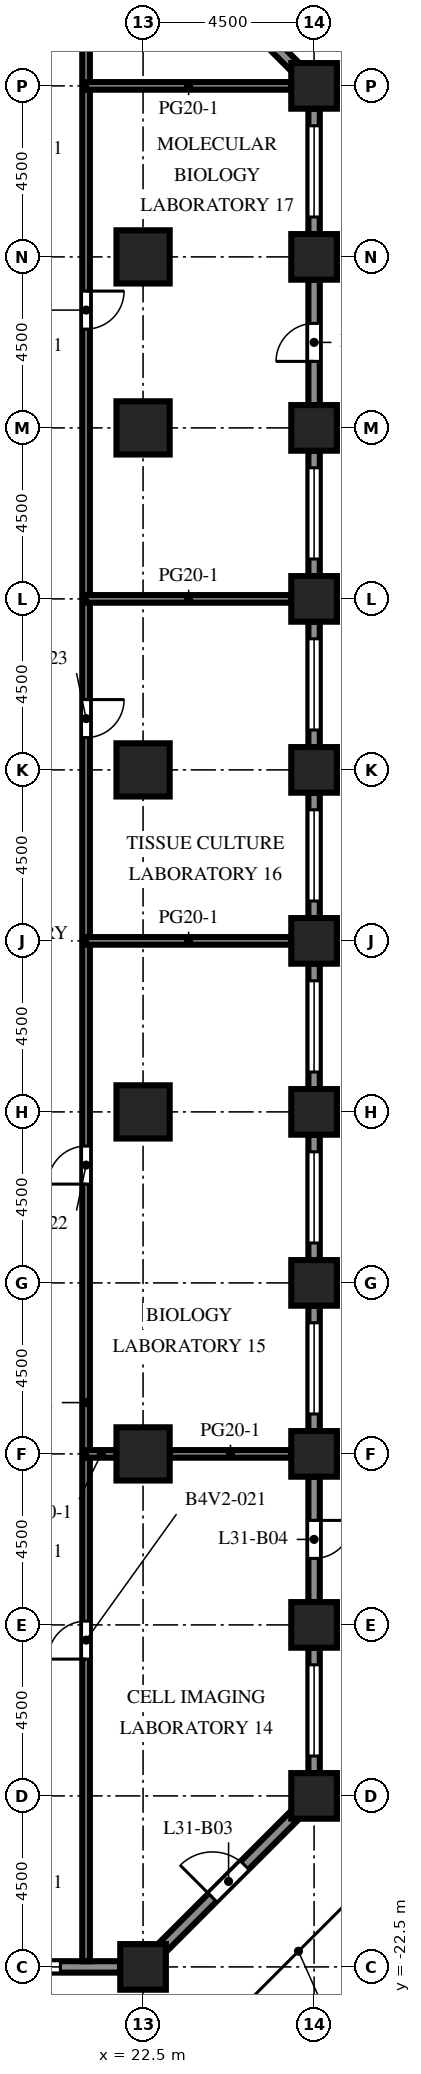
"""IFC4 building model, lengths in metres.
Left out: names, types, materials, properties, quantities, classifications, styles, units other than length and angle.
Written with IfcOpenShell. Run it as: python <this file> out.ifc"""

import sys

from ifc_helpers import new_model, si_unit, direction, frame, frame_2d, origin, origin_2d, place, context, subcontext, project, spatial, rectangle, extrude, element, fill, save


model = new_model("IFC4")
c1 = context("Model", 3, precision=1e-05, world=origin(), true_north=direction((0.0, 1.0)))
c2 = subcontext(c1, "Body", "Model", "MODEL_VIEW")
j1 = project(units=[si_unit("LENGTHUNIT", "METRE"), si_unit("PLANEANGLEUNIT", "RADIAN")], contexts=[c1])
p1 = place(None, origin())
s1 = spatial("IfcSite", under=j1, at=p1, CompositionType="ELEMENT")
p2 = place(p1, origin())
s2 = spatial("IfcBuilding", under=s1, at=p2, CompositionType="ELEMENT")
p3 = place(p2, frame((0.0, 0.0, 137.2)))
s3 = spatial("IfcBuildingStorey", under=s2, at=p3, CompositionType="ELEMENT", Elevation=137.2)
for number, where, z_axis, x_axis in (
    (1, (22.5, -22.5, 0.0), (0.0, 0.0, 1.0), (1.0, 0.0, 0.0)),
    (2, (27.0, -18.0, 0.0), (0.0, 0.0, 1.0), (1.0, 0.0, 0.0)),
    (3, (27.0, -13.5, 0.0), (0.0, 0.0, 1.0), (1.0, 0.0, 0.0)),
    (4, (27.0, -9.0, 0.0), (0.0, 0.0, 1.0), (1.0, 0.0, 0.0)),
    (5, (27.0, -4.5, 0.0), (0.0, 0.0, 1.0), (1.0, 0.0, 0.0)),
    (6, (27.0, 0.0, 0.0), (0.0, 0.0, 1.0), (1.0, 0.0, 0.0)),
    (7, (27.0, 4.5, 0.0), (0.0, 0.0, 1.0), (1.0, 0.0, 0.0)),
    (8, (27.0, 9.0, 0.0), (0.0, 0.0, 1.0), (1.0, 0.0, 0.0)),
    (9, (27.0, 13.5, 0.0), (0.0, 0.0, 1.0), (1.0, 0.0, 0.0)),
    (10, (27.0, 18.0, 0.0), (0.0, 0.0, 1.0), (1.0, 0.0, 0.0)),
    (11, (27.0, 22.5, 0.0), (0.0, 0.0, 1.0), (1.0, 0.0, 0.0)),
    (12, (27.0, 27.0, 0.0), (0.0, 0.0, 1.0), (1.0, 0.0, 0.0)),
):
    element("IfcColumn", number, at=place(p3, frame(where, z_axis=z_axis, x_axis=x_axis)), inside=s3, PredefinedType="COLUMN", context=c2, shape_type="SweptSolid", body=[
        extrude(rectangle(XDim=1.2, YDim=1.2, at=origin_2d()), origin(), (0.0, 0.0, 1.0), 4.1),
    ])
for number, where, z_axis, x_axis in (
    (13, (22.5, -9.0, 0.0), (0.0, 0.0, 1.0), (1.0, 0.0, 0.0)),
    (14, (22.5, 0.0, 0.0), (0.0, 0.0, 1.0), (1.0, 0.0, 0.0)),
    (15, (22.5, 9.0, 0.0), (0.0, 0.0, 1.0), (1.0, 0.0, 0.0)),
    (16, (22.5, 18.0, 0.0), (0.0, 0.0, 1.0), (1.0, 0.0, 0.0)),
    (17, (22.5, 22.5, 0.0), (0.0, 0.0, 1.0), (1.0, 0.0, 0.0)),
):
    element("IfcColumn", number, at=place(p3, frame(where, z_axis=z_axis, x_axis=x_axis)), inside=s3, PredefinedType="COLUMN", context=c2, shape_type="SweptSolid", body=[
        extrude(rectangle(XDim=1.4, YDim=1.4, at=origin_2d()), origin(), (0.0, 0.0, 1.0), 4.1),
    ])
p4 = place(p3, frame((21.9, -22.5, 0.0), z_axis=(0.0, 0.0, 1.0), x_axis=(-1.0, 0.0, 0.0)))
e18 = element("IfcWall", 18, at=p4, inside=s3, PredefinedType="SOLIDWALL", context=c2, shape_type="SweptSolid", body=[
    extrude(rectangle(XDim=3.3, YDim=0.3, at=frame_2d((1.65, 0.0))), origin(), (0.0, 0.0, 1.0), 2.75),
])
p5 = place(p4, frame((1.575, 0.0, 0.8)))
e19 = element("IfcOpeningElement", 19, at=p5, cuts=e18, PredefinedType="OPENING", context=c2, shape_type="SweptSolid", body=[
    extrude(rectangle(XDim=1.2, YDim=1.7, at=frame_2d((0.6, 0.85))), frame((0.0, 0.16, 0.0), z_axis=(0.0, -1.0, 0.0), x_axis=(1.0, 0.0, 0.0)), (0.0, 0.0, 1.0), 0.32),
])
p6 = place(p3, frame((26.506, -18.494, 0.0), z_axis=(0.0, 0.0, 1.0), x_axis=(-0.707106781187, -0.707106781187, 0.0)))
e20 = element("IfcWall", 20, at=p6, inside=s3, PredefinedType="SOLIDWALL", context=c2, shape_type="SweptSolid", body=[
    extrude(rectangle(XDim=4.967, YDim=0.3, at=frame_2d((2.483, 0.0))), origin(), (0.0, 0.0, 1.0), 2.75),
])
p7 = place(p6, frame((1.884, 0.0, 0.0)))
e21 = element("IfcOpeningElement", 21, at=p7, cuts=e20, PredefinedType="OPENING", context=c2, shape_type="SweptSolid", body=[
    extrude(rectangle(XDim=1.2, YDim=2.2, at=frame_2d((0.6, 1.1))), frame((0.0, 0.16, 0.0), z_axis=(0.0, -1.0, 0.0), x_axis=(1.0, 0.0, 0.0)), (0.0, 0.0, 1.0), 0.32),
])
p8 = place(p3, frame((27.0, -14.1, 0.0), z_axis=(0.0, 0.0, 1.0), x_axis=(0.0, -1.0, 0.0)))
e22 = element("IfcWall", 22, at=p8, inside=s3, PredefinedType="SOLIDWALL", context=c2, shape_type="SweptSolid", body=[
    extrude(rectangle(XDim=3.3, YDim=0.3, at=frame_2d((1.65, 0.0))), origin(), (0.0, 0.0, 1.0), 2.75),
])
p9 = place(p8, frame((0.45, 0.0, 0.8)))
e23 = element("IfcOpeningElement", 23, at=p9, cuts=e22, PredefinedType="OPENING", context=c2, shape_type="SweptSolid", body=[
    extrude(rectangle(XDim=2.4, YDim=1.7, at=frame_2d((1.2, 0.85))), frame((0.0, 0.16, 0.0), z_axis=(0.0, -1.0, 0.0), x_axis=(1.0, 0.0, 0.0)), (0.0, 0.0, 1.0), 0.32),
])
p10 = place(p3, frame((27.0, -9.6, 0.0), z_axis=(0.0, 0.0, 1.0), x_axis=(0.0, -1.0, 0.0)))
e24 = element("IfcWall", 24, at=p10, inside=s3, PredefinedType="SOLIDWALL", context=c2, shape_type="SweptSolid", body=[
    extrude(rectangle(XDim=3.3, YDim=0.3, at=frame_2d((1.65, 0.0))), origin(), (0.0, 0.0, 1.0), 2.75),
])
p11 = place(p10, frame((1.15, 0.0, 0.0)))
e25 = element("IfcOpeningElement", 25, at=p11, cuts=e24, PredefinedType="OPENING", context=c2, shape_type="SweptSolid", body=[
    extrude(rectangle(XDim=1.0, YDim=2.2, at=frame_2d((0.5, 1.1))), frame((0.0, 0.16, 0.0), z_axis=(0.0, -1.0, 0.0), x_axis=(1.0, 0.0, 0.0)), (0.0, 0.0, 1.0), 0.32),
])
p12 = place(p3, frame((27.0, -5.1, 0.0), z_axis=(0.0, 0.0, 1.0), x_axis=(0.0, -1.0, 0.0)))
e26 = element("IfcWall", 26, at=p12, inside=s3, PredefinedType="SOLIDWALL", context=c2, shape_type="SweptSolid", body=[
    extrude(rectangle(XDim=3.3, YDim=0.3, at=frame_2d((1.65, 0.0))), origin(), (0.0, 0.0, 1.0), 2.75),
])
p13 = place(p12, frame((0.45, 0.0, 0.8)))
e27 = element("IfcOpeningElement", 27, at=p13, cuts=e26, PredefinedType="OPENING", context=c2, shape_type="SweptSolid", body=[
    extrude(rectangle(XDim=2.4, YDim=1.7, at=frame_2d((1.2, 0.85))), frame((0.0, 0.16, 0.0), z_axis=(0.0, -1.0, 0.0), x_axis=(1.0, 0.0, 0.0)), (0.0, 0.0, 1.0), 0.32),
])
p14 = place(p3, frame((27.0, -0.6, 0.0), z_axis=(0.0, 0.0, 1.0), x_axis=(0.0, -1.0, 0.0)))
e28 = element("IfcWall", 28, at=p14, inside=s3, PredefinedType="SOLIDWALL", context=c2, shape_type="SweptSolid", body=[
    extrude(rectangle(XDim=3.3, YDim=0.3, at=frame_2d((1.65, 0.0))), origin(), (0.0, 0.0, 1.0), 2.75),
])
p15 = place(p14, frame((0.45, 0.0, 0.8)))
e29 = element("IfcOpeningElement", 29, at=p15, cuts=e28, PredefinedType="OPENING", context=c2, shape_type="SweptSolid", body=[
    extrude(rectangle(XDim=2.4, YDim=1.7, at=frame_2d((1.2, 0.85))), frame((0.0, 0.16, 0.0), z_axis=(0.0, -1.0, 0.0), x_axis=(1.0, 0.0, 0.0)), (0.0, 0.0, 1.0), 0.32),
])
p16 = place(p3, frame((27.0, 3.9, 0.0), z_axis=(0.0, 0.0, 1.0), x_axis=(0.0, -1.0, 0.0)))
e30 = element("IfcWall", 30, at=p16, inside=s3, PredefinedType="SOLIDWALL", context=c2, shape_type="SweptSolid", body=[
    extrude(rectangle(XDim=3.3, YDim=0.3, at=frame_2d((1.65, 0.0))), origin(), (0.0, 0.0, 1.0), 2.75),
])
p17 = place(p16, frame((0.45, 0.0, 0.8)))
e31 = element("IfcOpeningElement", 31, at=p17, cuts=e30, PredefinedType="OPENING", context=c2, shape_type="SweptSolid", body=[
    extrude(rectangle(XDim=2.4, YDim=1.7, at=frame_2d((1.2, 0.85))), frame((0.0, 0.16, 0.0), z_axis=(0.0, -1.0, 0.0), x_axis=(1.0, 0.0, 0.0)), (0.0, 0.0, 1.0), 0.32),
])
p18 = place(p3, frame((27.0, 8.4, 0.0), z_axis=(0.0, 0.0, 1.0), x_axis=(0.0, -1.0, 0.0)))
e32 = element("IfcWall", 32, at=p18, inside=s3, PredefinedType="SOLIDWALL", context=c2, shape_type="SweptSolid", body=[
    extrude(rectangle(XDim=3.3, YDim=0.3, at=frame_2d((1.65, 0.0))), origin(), (0.0, 0.0, 1.0), 2.75),
])
p19 = place(p18, frame((0.45, 0.0, 0.8)))
e33 = element("IfcOpeningElement", 33, at=p19, cuts=e32, PredefinedType="OPENING", context=c2, shape_type="SweptSolid", body=[
    extrude(rectangle(XDim=2.4, YDim=1.7, at=frame_2d((1.2, 0.85))), frame((0.0, 0.16, 0.0), z_axis=(0.0, -1.0, 0.0), x_axis=(1.0, 0.0, 0.0)), (0.0, 0.0, 1.0), 0.32),
])
p20 = place(p3, frame((27.0, 12.9, 0.0), z_axis=(0.0, 0.0, 1.0), x_axis=(0.0, -1.0, 0.0)))
e34 = element("IfcWall", 34, at=p20, inside=s3, PredefinedType="SOLIDWALL", context=c2, shape_type="SweptSolid", body=[
    extrude(rectangle(XDim=3.3, YDim=0.3, at=frame_2d((1.65, 0.0))), origin(), (0.0, 0.0, 1.0), 2.75),
])
p21 = place(p20, frame((0.45, 0.0, 0.8)))
e35 = element("IfcOpeningElement", 35, at=p21, cuts=e34, PredefinedType="OPENING", context=c2, shape_type="SweptSolid", body=[
    extrude(rectangle(XDim=2.4, YDim=1.7, at=frame_2d((1.2, 0.85))), frame((0.0, 0.16, 0.0), z_axis=(0.0, -1.0, 0.0), x_axis=(1.0, 0.0, 0.0)), (0.0, 0.0, 1.0), 0.32),
])
p22 = place(p3, frame((27.0, 17.4, 0.0), z_axis=(0.0, 0.0, 1.0), x_axis=(0.0, -1.0, 0.0)))
e36 = element("IfcWall", 36, at=p22, inside=s3, PredefinedType="SOLIDWALL", context=c2, shape_type="SweptSolid", body=[
    extrude(rectangle(XDim=3.3, YDim=0.3, at=frame_2d((1.65, 0.0))), origin(), (0.0, 0.0, 1.0), 2.75),
])
p23 = place(p22, frame((0.45, 0.0, 0.8)))
e37 = element("IfcOpeningElement", 37, at=p23, cuts=e36, PredefinedType="OPENING", context=c2, shape_type="SweptSolid", body=[
    extrude(rectangle(XDim=2.4, YDim=1.7, at=frame_2d((1.2, 0.85))), frame((0.0, 0.16, 0.0), z_axis=(0.0, -1.0, 0.0), x_axis=(1.0, 0.0, 0.0)), (0.0, 0.0, 1.0), 0.32),
])
p24 = place(p3, frame((27.0, 21.9, 0.0), z_axis=(0.0, 0.0, 1.0), x_axis=(0.0, -1.0, 0.0)))
e38 = element("IfcWall", 38, at=p24, inside=s3, PredefinedType="SOLIDWALL", context=c2, shape_type="SweptSolid", body=[
    extrude(rectangle(XDim=3.3, YDim=0.3, at=frame_2d((1.65, 0.0))), origin(), (0.0, 0.0, 1.0), 2.75),
])
p25 = place(p24, frame((1.15, 0.0, 0.0)))
e39 = element("IfcOpeningElement", 39, at=p25, cuts=e38, PredefinedType="OPENING", context=c2, shape_type="SweptSolid", body=[
    extrude(rectangle(XDim=1.0, YDim=2.2, at=frame_2d((0.5, 1.1))), frame((0.0, 0.16, 0.0), z_axis=(0.0, -1.0, 0.0), x_axis=(1.0, 0.0, 0.0)), (0.0, 0.0, 1.0), 0.32),
])
p26 = place(p3, frame((27.0, 26.4, 0.0), z_axis=(0.0, 0.0, 1.0), x_axis=(0.0, -1.0, 0.0)))
e40 = element("IfcWall", 40, at=p26, inside=s3, PredefinedType="SOLIDWALL", context=c2, shape_type="SweptSolid", body=[
    extrude(rectangle(XDim=3.3, YDim=0.3, at=frame_2d((1.65, 0.0))), origin(), (0.0, 0.0, 1.0), 2.75),
])
p27 = place(p26, frame((0.45, 0.0, 0.8)))
e41 = element("IfcOpeningElement", 41, at=p27, cuts=e40, PredefinedType="OPENING", context=c2, shape_type="SweptSolid", body=[
    extrude(rectangle(XDim=2.4, YDim=1.7, at=frame_2d((1.2, 0.85))), frame((0.0, 0.16, 0.0), z_axis=(0.0, -1.0, 0.0), x_axis=(1.0, 0.0, 0.0)), (0.0, 0.0, 1.0), 0.32),
])
p28 = place(p3, frame((22.994, 31.006, 0.0), z_axis=(0.0, 0.0, 1.0), x_axis=(0.707106781187, -0.707106781187, 0.0)))
e42 = element("IfcWall", 42, at=p28, inside=s3, PredefinedType="SOLIDWALL", context=c2, shape_type="SweptSolid", body=[
    extrude(rectangle(XDim=4.967, YDim=0.3, at=frame_2d((2.483, 0.0))), origin(), (0.0, 0.0, 1.0), 2.75),
])
p29 = place(p28, frame((1.884, 0.0, 0.0)))
e43 = element("IfcOpeningElement", 43, at=p29, cuts=e42, PredefinedType="OPENING", context=c2, shape_type="SweptSolid", body=[
    extrude(rectangle(XDim=1.2, YDim=2.2, at=frame_2d((0.6, 1.1))), frame((0.0, 0.16, 0.0), z_axis=(0.0, -1.0, 0.0), x_axis=(1.0, 0.0, 0.0)), (0.0, 0.0, 1.0), 0.32),
])
p30 = place(p3, frame((21.0, 31.35, 0.0), z_axis=(0.0, 0.0, 1.0), x_axis=(0.0, -1.0, 0.0)))
e44 = element("IfcWall", 44, at=p30, inside=s3, PredefinedType="PARTITIONING", context=c2, shape_type="SweptSolid", body=[
    extrude(rectangle(XDim=53.7, YDim=0.2, at=frame_2d((26.85, 0.0))), origin(), (0.0, 0.0, 1.0), 3.65),
])
p31 = place(p30, frame((44.75, 0.0, 0.0)))
e45 = element("IfcOpeningElement", 45, at=p31, cuts=e44, PredefinedType="OPENING", context=c2, shape_type="SweptSolid", body=[
    extrude(rectangle(XDim=1.0, YDim=2.1, at=frame_2d((0.5, 1.05))), frame((0.0, 0.11, 0.0), z_axis=(0.0, -1.0, 0.0), x_axis=(1.0, 0.0, 0.0)), (0.0, 0.0, 1.0), 0.22),
])
p32 = place(p30, frame((32.25, 0.0, 0.0)))
e46 = element("IfcOpeningElement", 46, at=p32, cuts=e44, PredefinedType="OPENING", context=c2, shape_type="SweptSolid", body=[
    extrude(rectangle(XDim=1.0, YDim=2.1, at=frame_2d((0.5, 1.05))), frame((0.0, 0.11, 0.0), z_axis=(0.0, -1.0, 0.0), x_axis=(1.0, 0.0, 0.0)), (0.0, 0.0, 1.0), 0.22),
])
p33 = place(p30, frame((20.5, 0.0, 0.0)))
e47 = element("IfcOpeningElement", 47, at=p33, cuts=e44, PredefinedType="OPENING", context=c2, shape_type="SweptSolid", body=[
    extrude(rectangle(XDim=1.0, YDim=2.1, at=frame_2d((0.5, 1.05))), frame((0.0, 0.11, 0.0), z_axis=(0.0, -1.0, 0.0), x_axis=(1.0, 0.0, 0.0)), (0.0, 0.0, 1.0), 0.22),
])
p34 = place(p30, frame((9.75, 0.0, 0.0)))
e48 = element("IfcOpeningElement", 48, at=p34, cuts=e44, PredefinedType="OPENING", context=c2, shape_type="SweptSolid", body=[
    extrude(rectangle(XDim=1.0, YDim=2.1, at=frame_2d((0.5, 1.05))), frame((0.0, 0.11, 0.0), z_axis=(0.0, -1.0, 0.0), x_axis=(1.0, 0.0, 0.0)), (0.0, 0.0, 1.0), 0.22),
])
p35 = place(p30, frame((1.5, 0.0, 0.0)))
e49 = element("IfcOpeningElement", 49, at=p35, cuts=e44, PredefinedType="OPENING", context=c2, shape_type="SweptSolid", body=[
    extrude(rectangle(XDim=1.0, YDim=2.1, at=frame_2d((0.5, 1.05))), frame((0.0, 0.11, 0.0), z_axis=(0.0, -1.0, 0.0), x_axis=(1.0, 0.0, 0.0)), (0.0, 0.0, 1.0), 0.22),
])
p36 = place(p3, frame((21.0, -9.0, 0.0), z_axis=(0.0, 0.0, 1.0), x_axis=(1.0, 0.0, 0.0)))
e50 = element("IfcWall", 50, at=p36, inside=s3, PredefinedType="PARTITIONING", context=c2, shape_type="SweptSolid", body=[
    extrude(rectangle(XDim=0.8, YDim=0.2, at=frame_2d((0.4, 0.0))), origin(), (0.0, 0.0, 1.0), 3.65),
])
p37 = place(p3, frame((23.2, -9.0, 0.0), z_axis=(0.0, 0.0, 1.0), x_axis=(1.0, 0.0, 0.0)))
e51 = element("IfcWall", 51, at=p37, inside=s3, PredefinedType="PARTITIONING", context=c2, shape_type="SweptSolid", body=[
    extrude(rectangle(XDim=3.2, YDim=0.2, at=frame_2d((1.6, 0.0))), origin(), (0.0, 0.0, 1.0), 3.65),
])
for number, where, z_axis, x_axis in (
    (52, (21.0, 4.5, 0.0), (0.0, 0.0, 1.0), (1.0, 0.0, 0.0)),
    (53, (21.0, 13.5, 0.0), (0.0, 0.0, 1.0), (1.0, 0.0, 0.0)),
    (54, (21.0, 27.0, 0.0), (0.0, 0.0, 1.0), (1.0, 0.0, 0.0)),
):
    element("IfcWall", number, at=place(p3, frame(where, z_axis=z_axis, x_axis=x_axis)), inside=s3, PredefinedType="PARTITIONING", context=c2, shape_type="SweptSolid", body=[
        extrude(rectangle(XDim=5.4, YDim=0.2, at=frame_2d((2.7, 0.0))), origin(), (0.0, 0.0, 1.0), 3.65),
    ])
p38 = place(p5, origin())
e55 = element("IfcWindow", 55, at=p38, inside=s3, PartitioningType="SINGLE_PANEL", PredefinedType="WINDOW", context=c2, shape_type="SweptSolid", body=[
    extrude(rectangle(XDim=1.2, YDim=1.7, at=frame_2d((0.6, 0.85))), frame((0.0, 0.03, 0.0), z_axis=(0.0, -1.0, 0.0), x_axis=(1.0, 0.0, 0.0)), (0.0, 0.0, 1.0), 0.06),
])
fill(e19, e55)
p39 = place(p7, origin())
e56 = element("IfcDoor", 56, at=p39, inside=s3, OperationType="SINGLE_SWING_RIGHT", PredefinedType="DOOR", context=c2, shape_type="SweptSolid", body=[
    extrude(rectangle(XDim=1.2, YDim=2.2, at=frame_2d((0.6, 1.1))), frame((0.0, 0.025, 0.0), z_axis=(0.0, -1.0, 0.0), x_axis=(1.0, 0.0, 0.0)), (0.0, 0.0, 1.0), 0.05),
])
fill(e21, e56)
p40 = place(p9, origin())
e57 = element("IfcWindow", 57, at=p40, inside=s3, PartitioningType="SINGLE_PANEL", PredefinedType="WINDOW", context=c2, shape_type="SweptSolid", body=[
    extrude(rectangle(XDim=2.4, YDim=1.7, at=frame_2d((1.2, 0.85))), frame((0.0, 0.03, 0.0), z_axis=(0.0, -1.0, 0.0), x_axis=(1.0, 0.0, 0.0)), (0.0, 0.0, 1.0), 0.06),
])
fill(e23, e57)
p41 = place(p11, origin())
e58 = element("IfcDoor", 58, at=p41, inside=s3, OperationType="SINGLE_SWING_LEFT", PredefinedType="DOOR", context=c2, shape_type="SweptSolid", body=[
    extrude(rectangle(XDim=1.0, YDim=2.2, at=frame_2d((0.5, 1.1))), frame((0.0, 0.025, 0.0), z_axis=(0.0, -1.0, 0.0), x_axis=(1.0, 0.0, 0.0)), (0.0, 0.0, 1.0), 0.05),
])
fill(e25, e58)
p42 = place(p13, origin())
e59 = element("IfcWindow", 59, at=p42, inside=s3, PartitioningType="SINGLE_PANEL", PredefinedType="WINDOW", context=c2, shape_type="SweptSolid", body=[
    extrude(rectangle(XDim=2.4, YDim=1.7, at=frame_2d((1.2, 0.85))), frame((0.0, 0.03, 0.0), z_axis=(0.0, -1.0, 0.0), x_axis=(1.0, 0.0, 0.0)), (0.0, 0.0, 1.0), 0.06),
])
fill(e27, e59)
p43 = place(p15, origin())
e60 = element("IfcWindow", 60, at=p43, inside=s3, PartitioningType="SINGLE_PANEL", PredefinedType="WINDOW", context=c2, shape_type="SweptSolid", body=[
    extrude(rectangle(XDim=2.4, YDim=1.7, at=frame_2d((1.2, 0.85))), frame((0.0, 0.03, 0.0), z_axis=(0.0, -1.0, 0.0), x_axis=(1.0, 0.0, 0.0)), (0.0, 0.0, 1.0), 0.06),
])
fill(e29, e60)
p44 = place(p17, origin())
e61 = element("IfcWindow", 61, at=p44, inside=s3, PartitioningType="SINGLE_PANEL", PredefinedType="WINDOW", context=c2, shape_type="SweptSolid", body=[
    extrude(rectangle(XDim=2.4, YDim=1.7, at=frame_2d((1.2, 0.85))), frame((0.0, 0.03, 0.0), z_axis=(0.0, -1.0, 0.0), x_axis=(1.0, 0.0, 0.0)), (0.0, 0.0, 1.0), 0.06),
])
fill(e31, e61)
p45 = place(p19, origin())
e62 = element("IfcWindow", 62, at=p45, inside=s3, PartitioningType="SINGLE_PANEL", PredefinedType="WINDOW", context=c2, shape_type="SweptSolid", body=[
    extrude(rectangle(XDim=2.4, YDim=1.7, at=frame_2d((1.2, 0.85))), frame((0.0, 0.03, 0.0), z_axis=(0.0, -1.0, 0.0), x_axis=(1.0, 0.0, 0.0)), (0.0, 0.0, 1.0), 0.06),
])
fill(e33, e62)
p46 = place(p21, origin())
e63 = element("IfcWindow", 63, at=p46, inside=s3, PartitioningType="SINGLE_PANEL", PredefinedType="WINDOW", context=c2, shape_type="SweptSolid", body=[
    extrude(rectangle(XDim=2.4, YDim=1.7, at=frame_2d((1.2, 0.85))), frame((0.0, 0.03, 0.0), z_axis=(0.0, -1.0, 0.0), x_axis=(1.0, 0.0, 0.0)), (0.0, 0.0, 1.0), 0.06),
])
fill(e35, e63)
p47 = place(p23, origin())
e64 = element("IfcWindow", 64, at=p47, inside=s3, PartitioningType="SINGLE_PANEL", PredefinedType="WINDOW", context=c2, shape_type="SweptSolid", body=[
    extrude(rectangle(XDim=2.4, YDim=1.7, at=frame_2d((1.2, 0.85))), frame((0.0, 0.03, 0.0), z_axis=(0.0, -1.0, 0.0), x_axis=(1.0, 0.0, 0.0)), (0.0, 0.0, 1.0), 0.06),
])
fill(e37, e64)
p48 = place(p25, origin())
e65 = element("IfcDoor", 65, at=p48, inside=s3, OperationType="SINGLE_SWING_RIGHT", PredefinedType="DOOR", context=c2, shape_type="SweptSolid", body=[
    extrude(rectangle(XDim=1.0, YDim=2.2, at=frame_2d((0.5, 1.1))), frame((0.0, 0.025, 0.0), z_axis=(0.0, -1.0, 0.0), x_axis=(1.0, 0.0, 0.0)), (0.0, 0.0, 1.0), 0.05),
])
fill(e39, e65)
p49 = place(p27, origin())
e66 = element("IfcWindow", 66, at=p49, inside=s3, PartitioningType="SINGLE_PANEL", PredefinedType="WINDOW", context=c2, shape_type="SweptSolid", body=[
    extrude(rectangle(XDim=2.4, YDim=1.7, at=frame_2d((1.2, 0.85))), frame((0.0, 0.03, 0.0), z_axis=(0.0, -1.0, 0.0), x_axis=(1.0, 0.0, 0.0)), (0.0, 0.0, 1.0), 0.06),
])
fill(e41, e66)
p50 = place(p31, origin())
e67 = element("IfcDoor", 67, at=p50, inside=s3, OperationType="SINGLE_SWING_RIGHT", PredefinedType="DOOR", context=c2, shape_type="SweptSolid", body=[
    extrude(rectangle(XDim=1.0, YDim=2.1, at=frame_2d((0.5, 1.05))), frame((0.0, 0.025, 0.0), z_axis=(0.0, -1.0, 0.0), x_axis=(1.0, 0.0, 0.0)), (0.0, 0.0, 1.0), 0.05),
])
fill(e45, e67)
p51 = place(p32, origin())
e68 = element("IfcDoor", 68, at=p51, inside=s3, OperationType="SINGLE_SWING_RIGHT", PredefinedType="DOOR", context=c2, shape_type="SweptSolid", body=[
    extrude(rectangle(XDim=1.0, YDim=2.1, at=frame_2d((0.5, 1.05))), frame((0.0, 0.025, 0.0), z_axis=(0.0, -1.0, 0.0), x_axis=(1.0, 0.0, 0.0)), (0.0, 0.0, 1.0), 0.05),
])
fill(e46, e68)
p52 = place(p33, origin())
e69 = element("IfcDoor", 69, at=p52, inside=s3, OperationType="SINGLE_SWING_LEFT", PredefinedType="DOOR", context=c2, shape_type="SweptSolid", body=[
    extrude(rectangle(XDim=1.0, YDim=2.1, at=frame_2d((0.5, 1.05))), frame((0.0, 0.025, 0.0), z_axis=(0.0, -1.0, 0.0), x_axis=(1.0, 0.0, 0.0)), (0.0, 0.0, 1.0), 0.05),
])
fill(e47, e69)
p53 = place(p34, origin())
e70 = element("IfcDoor", 70, at=p53, inside=s3, OperationType="SINGLE_SWING_LEFT", PredefinedType="DOOR", context=c2, shape_type="SweptSolid", body=[
    extrude(rectangle(XDim=1.0, YDim=2.1, at=frame_2d((0.5, 1.05))), frame((0.0, 0.025, 0.0), z_axis=(0.0, -1.0, 0.0), x_axis=(1.0, 0.0, 0.0)), (0.0, 0.0, 1.0), 0.05),
])
fill(e48, e70)
save(model, sys.argv[1])
